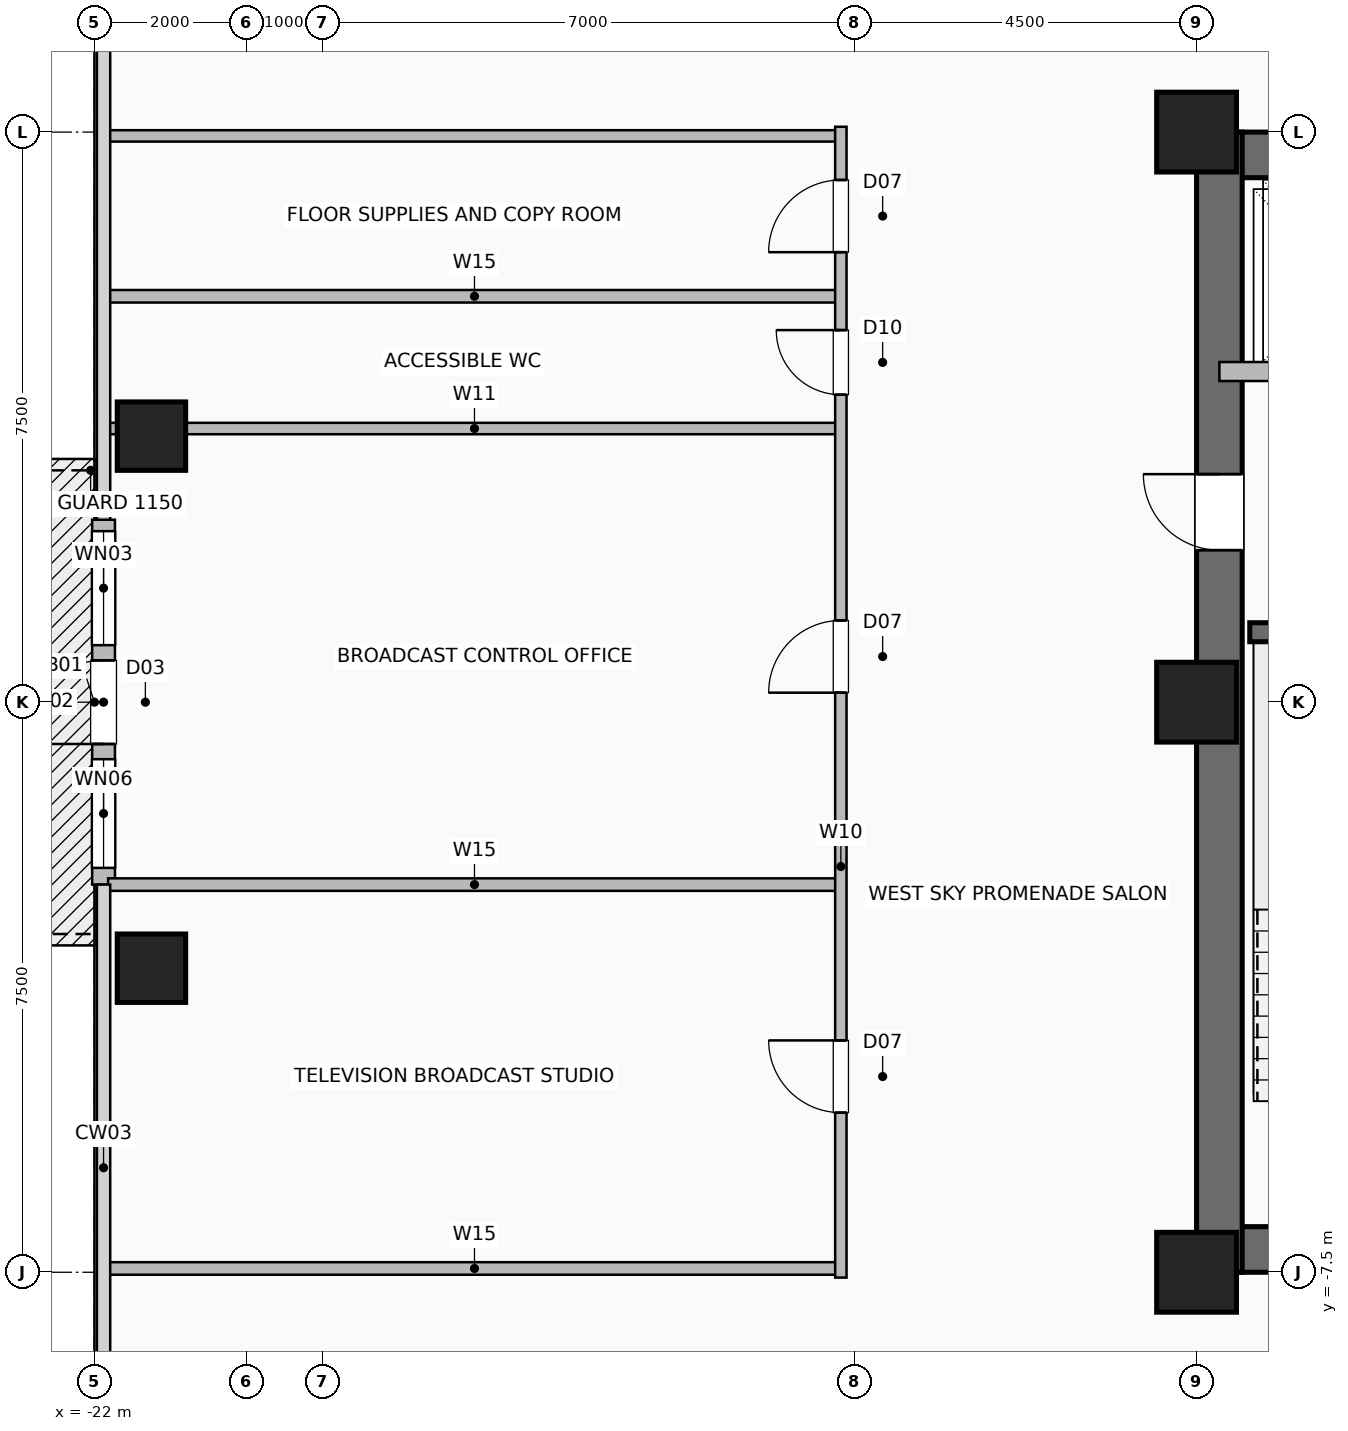
"""IFC4 building model, lengths in metres.
Left out: names, types, materials, properties, quantities, classifications, styles, units other than length and angle.
Written with IfcOpenShell. Run it as: python <this file> out.ifc"""

import sys

from ifc_helpers import new_model, si_unit, direction, frame, frame_2d, origin, origin_2d, place, context, subcontext, project, spatial, rectangle, hollow_rectangle, extrude, element, fill, save


model = new_model("IFC4")
c1 = context("Model", 3, precision=1e-05, world=origin(), true_north=direction((0.0, 1.0)))
c2 = subcontext(c1, "Body", "Model", "MODEL_VIEW")
j1 = project(units=[si_unit("LENGTHUNIT", "METRE"), si_unit("PLANEANGLEUNIT", "RADIAN")], contexts=[c1])
p1 = place(None, origin())
s1 = spatial("IfcSite", under=j1, at=p1, CompositionType="ELEMENT")
p2 = place(p1, origin())
s2 = spatial("IfcBuilding", under=s1, at=p2, CompositionType="ELEMENT")
p3 = place(p2, frame((0.0, 0.0, 144.4)))
s3 = spatial("IfcBuildingStorey", under=s2, at=p3, CompositionType="ELEMENT", Elevation=144.4)
for number, where, z_axis, x_axis in (
    (1, (-7.5, -7.5, 0.0), (0.0, 0.0, 1.0), (1.0, 0.0, 0.0)),
    (2, (-7.5, 7.5, 0.0), (0.0, 0.0, 1.0), (1.0, 0.0, 0.0)),
    (3, (-7.5, 0.0, 0.0), (0.0, 0.0, 1.0), (1.0, 0.0, 0.0)),
):
    element("IfcColumn", number, at=place(p3, frame(where, z_axis=z_axis, x_axis=x_axis)), inside=s3, PredefinedType="COLUMN", context=c2, shape_type="SweptSolid", body=[
        extrude(hollow_rectangle(XDim=1.05, YDim=1.05, WallThickness=0.05, at=origin_2d()), origin(), (0.0, 0.0, 1.0), 3.6),
    ])
for number, where, z_axis, x_axis in (
    (4, (-21.25, -3.5, 0.0), (0.0, 0.0, 1.0), (1.0, 0.0, 0.0)),
    (5, (-21.25, 3.5, 0.0), (0.0, 0.0, 1.0), (1.0, 0.0, 0.0)),
):
    element("IfcColumn", number, at=place(p3, frame(where, z_axis=z_axis, x_axis=x_axis)), inside=s3, PredefinedType="COLUMN", context=c2, shape_type="SweptSolid", body=[
        extrude(hollow_rectangle(XDim=0.9, YDim=0.9, WallThickness=0.045, at=origin_2d()), origin(), (0.0, 0.0, 1.0), 3.6),
    ])
p4 = place(p3, frame((-21.88, -2.4, 0.0), z_axis=(0.0, 0.0, 1.0), x_axis=(0.0, 1.0, 0.0)))
e6 = element("IfcWall", 6, at=p4, inside=s3, PredefinedType="SOLIDWALL", context=c2, shape_type="SweptSolid", body=[
    extrude(rectangle(XDim=4.8, YDim=0.3, at=frame_2d((2.4, 0.0))), origin(), (0.0, 0.0, 1.0), 3.36),
])
p5 = place(p4, frame((1.85, 0.0, 0.0)))
e7 = element("IfcOpeningElement", 7, at=p5, cuts=e6, PredefinedType="OPENING", context=c2, shape_type="SweptSolid", body=[
    extrude(rectangle(XDim=1.1, YDim=2.2, at=frame_2d((0.55, 1.1))), frame((0.0, 0.16, 0.0), z_axis=(0.0, -1.0, 0.0), x_axis=(1.0, 0.0, 0.0)), (0.0, 0.0, 1.0), 0.32),
])
p6 = place(p4, frame((0.22, 0.0, 0.85)))
e8 = element("IfcOpeningElement", 8, at=p6, cuts=e6, PredefinedType="OPENING", context=c2, shape_type="SweptSolid", body=[
    extrude(rectangle(XDim=1.43, YDim=1.8, at=frame_2d((0.715, 0.9))), frame((0.0, 0.16, 0.0), z_axis=(0.0, -1.0, 0.0), x_axis=(1.0, 0.0, 0.0)), (0.0, 0.0, 1.0), 0.32),
])
p7 = place(p4, frame((3.15, 0.0, 0.85)))
e9 = element("IfcOpeningElement", 9, at=p7, cuts=e6, PredefinedType="OPENING", context=c2, shape_type="SweptSolid", body=[
    extrude(rectangle(XDim=1.5, YDim=1.8, at=frame_2d((0.75, 0.9))), frame((0.0, 0.16, 0.0), z_axis=(0.0, -1.0, 0.0), x_axis=(1.0, 0.0, 0.0)), (0.0, 0.0, 1.0), 0.32),
])
p8 = place(p3, frame((-7.5, -7.2, 0.0), z_axis=(0.0, 0.0, 1.0), x_axis=(1.0, 0.0, 0.0)))
e10 = element("IfcWall", 10, at=p8, inside=s3, PredefinedType="SHEAR", context=c2, shape_type="SweptSolid", body=[
    extrude(rectangle(XDim=15.0, YDim=0.6, at=frame_2d((7.5, 0.0))), origin(), (0.0, 0.0, 1.0), 3.36),
])
p9 = place(p8, frame((1.55, 0.0, 0.0)))
e11 = element("IfcOpeningElement", 11, at=p9, cuts=e10, PredefinedType="OPENING", context=c2, shape_type="SweptSolid", body=[
    extrude(rectangle(XDim=1.05, YDim=2.08, at=frame_2d((0.525, 1.04))), frame((0.0, 0.31, 0.0), z_axis=(0.0, -1.0, 0.0), x_axis=(1.0, 0.0, 0.0)), (0.0, 0.0, 1.0), 0.62),
])
p10 = place(p8, frame((12.4, 0.0, 0.0)))
e12 = element("IfcOpeningElement", 12, at=p10, cuts=e10, PredefinedType="OPENING", context=c2, shape_type="SweptSolid", body=[
    extrude(rectangle(XDim=1.05, YDim=2.08, at=frame_2d((0.525, 1.04))), frame((0.0, 0.31, 0.0), z_axis=(0.0, -1.0, 0.0), x_axis=(1.0, 0.0, 0.0)), (0.0, 0.0, 1.0), 0.62),
])
p11 = place(p8, frame((4.95, 0.0, 0.0)))
e13 = element("IfcOpeningElement", 13, at=p11, cuts=e10, PredefinedType="OPENING", context=c2, shape_type="SweptSolid", body=[
    extrude(rectangle(XDim=1.0, YDim=2.08, at=frame_2d((0.5, 1.04))), frame((0.0, 0.31, 0.0), z_axis=(0.0, -1.0, 0.0), x_axis=(1.0, 0.0, 0.0)), (0.0, 0.0, 1.0), 0.62),
])
p12 = place(p8, frame((7.05, 0.0, 0.0)))
e14 = element("IfcOpeningElement", 14, at=p12, cuts=e10, PredefinedType="OPENING", context=c2, shape_type="SweptSolid", body=[
    extrude(rectangle(XDim=1.0, YDim=2.08, at=frame_2d((0.5, 1.04))), frame((0.0, 0.31, 0.0), z_axis=(0.0, -1.0, 0.0), x_axis=(1.0, 0.0, 0.0)), (0.0, 0.0, 1.0), 0.62),
])
p13 = place(p8, frame((9.15, 0.0, 0.0)))
e15 = element("IfcOpeningElement", 15, at=p13, cuts=e10, PredefinedType="OPENING", context=c2, shape_type="SweptSolid", body=[
    extrude(rectangle(XDim=1.0, YDim=2.08, at=frame_2d((0.5, 1.04))), frame((0.0, 0.31, 0.0), z_axis=(0.0, -1.0, 0.0), x_axis=(1.0, 0.0, 0.0)), (0.0, 0.0, 1.0), 0.62),
])
p14 = place(p3, frame((-7.5, 7.2, 0.0), z_axis=(0.0, 0.0, 1.0), x_axis=(1.0, 0.0, 0.0)))
e16 = element("IfcWall", 16, at=p14, inside=s3, PredefinedType="SHEAR", context=c2, shape_type="SweptSolid", body=[
    extrude(rectangle(XDim=15.0, YDim=0.6, at=frame_2d((7.5, 0.0))), origin(), (0.0, 0.0, 1.0), 3.36),
])
p15 = place(p3, frame((-7.2, -7.5, 0.0), z_axis=(0.0, 0.0, 1.0), x_axis=(0.0, 1.0, 0.0)))
e17 = element("IfcWall", 17, at=p15, inside=s3, PredefinedType="SHEAR", context=c2, shape_type="SweptSolid", body=[
    extrude(rectangle(XDim=15.0, YDim=0.6, at=frame_2d((7.5, 0.0))), origin(), (0.0, 0.0, 1.0), 3.36),
])
p16 = place(p15, frame((9.5, 0.0, 0.0)))
e18 = element("IfcOpeningElement", 18, at=p16, cuts=e17, PredefinedType="OPENING", context=c2, shape_type="SweptSolid", body=[
    extrude(rectangle(XDim=1.0, YDim=2.08, at=frame_2d((0.5, 1.04))), frame((0.0, 0.31, 0.0), z_axis=(0.0, -1.0, 0.0), x_axis=(1.0, 0.0, 0.0)), (0.0, 0.0, 1.0), 0.62),
])
p17 = place(p3, frame((-6.8, 0.92, 0.0), z_axis=(0.0, 0.0, 1.0), x_axis=(1.0, 0.0, 0.0)))
e19 = element("IfcWall", 19, at=p17, inside=s3, PredefinedType="SHEAR", context=c2, shape_type="SweptSolid", body=[
    extrude(rectangle(XDim=3.33, YDim=0.25, at=frame_2d((1.665, 0.0))), origin(), (0.0, 0.0, 1.0), 3.36),
])
p18 = place(p3, frame((-7.2, 4.35, 0.0), z_axis=(0.0, 0.0, 1.0), x_axis=(1.0, 0.0, 0.0)))
e20 = element("IfcWall", 20, at=p18, inside=s3, PredefinedType="SHEAR", context=c2, shape_type="SweptSolid", body=[
    extrude(rectangle(XDim=2.7, YDim=0.25, at=frame_2d((1.35, 0.0))), origin(), (0.0, 0.0, 1.0), 3.36),
])
p19 = place(p18, frame((0.75, 0.0, 0.0)))
e21 = element("IfcOpeningElement", 21, at=p19, cuts=e20, PredefinedType="OPENING", context=c2, shape_type="SweptSolid", body=[
    extrude(rectangle(XDim=1.2, YDim=2.2, at=frame_2d((0.6, 1.1))), frame((0.0, 0.135, 0.0), z_axis=(0.0, -1.0, 0.0), x_axis=(1.0, 0.0, 0.0)), (0.0, 0.0, 1.0), 0.27),
])
for number, where, z_axis, x_axis in (
    (22, (-21.82, 5.34, 0.0), (0.0, 0.0, 1.0), (1.0, 0.0, 0.0)),
    (23, (-21.82, -7.45, 0.0), (0.0, 0.0, 1.0), (1.0, 0.0, 0.0)),
    (24, (-21.82, -2.4, 0.0), (0.0, 0.0, 1.0), (1.0, 0.0, 0.0)),
):
    element("IfcWall", number, at=place(p3, frame(where, z_axis=z_axis, x_axis=x_axis)), inside=s3, PredefinedType="PLUMBINGWALL", context=c2, shape_type="SweptSolid", body=[
        extrude(rectangle(XDim=9.64, YDim=0.165, at=frame_2d((4.82, 0.0))), origin(), (0.0, 0.0, 1.0), 3.36),
    ])
p20 = place(p3, frame((-21.82, 3.6, 0.0), z_axis=(0.0, 0.0, 1.0), x_axis=(1.0, 0.0, 0.0)))
e25 = element("IfcWall", 25, at=p20, inside=s3, PredefinedType="PARTITIONING", context=c2, shape_type="SweptSolid", body=[
    extrude(rectangle(XDim=9.64, YDim=0.15, at=frame_2d((4.82, 0.0))), origin(), (0.0, 0.0, 1.0), 2.718),
])
p21 = place(p3, frame((-21.82, 7.45, 0.0), z_axis=(0.0, 0.0, 1.0), x_axis=(1.0, 0.0, 0.0)))
e26 = element("IfcWall", 26, at=p21, inside=s3, PredefinedType="PARTITIONING", context=c2, shape_type="SweptSolid", body=[
    extrude(rectangle(XDim=9.64, YDim=0.15, at=frame_2d((4.82, 0.0))), origin(), (0.0, 0.0, 1.0), 3.36),
])
p22 = place(p3, frame((-12.18, -7.57, 0.0), z_axis=(0.0, 0.0, 1.0), x_axis=(0.0, 1.0, 0.0)))
e27 = element("IfcWall", 27, at=p22, inside=s3, PredefinedType="PARTITIONING", context=c2, shape_type="SweptSolid", body=[
    extrude(rectangle(XDim=15.14, YDim=0.15, at=frame_2d((7.57, 0.0))), origin(), (0.0, 0.0, 1.0), 3.36),
])
p23 = place(p22, frame((2.17, 0.0, 0.0)))
e28 = element("IfcOpeningElement", 28, at=p23, cuts=e27, PredefinedType="OPENING", context=c2, shape_type="SweptSolid", body=[
    extrude(rectangle(XDim=0.95, YDim=2.06, at=frame_2d((0.475, 1.03))), frame((0.0, 0.085, 0.0), z_axis=(0.0, -1.0, 0.0), x_axis=(1.0, 0.0, 0.0)), (0.0, 0.0, 1.0), 0.17),
])
p24 = place(p22, frame((7.695, 0.0, 0.0)))
e29 = element("IfcOpeningElement", 29, at=p24, cuts=e27, PredefinedType="OPENING", context=c2, shape_type="SweptSolid", body=[
    extrude(rectangle(XDim=0.95, YDim=2.06, at=frame_2d((0.475, 1.03))), frame((0.0, 0.085, 0.0), z_axis=(0.0, -1.0, 0.0), x_axis=(1.0, 0.0, 0.0)), (0.0, 0.0, 1.0), 0.17),
])
p25 = place(p22, frame((11.615, 0.0, 0.0)))
e30 = element("IfcOpeningElement", 30, at=p25, cuts=e27, PredefinedType="OPENING", context=c2, shape_type="SweptSolid", body=[
    extrude(rectangle(XDim=0.85, YDim=2.05, at=frame_2d((0.425, 1.025))), frame((0.0, 0.085, 0.0), z_axis=(0.0, -1.0, 0.0), x_axis=(1.0, 0.0, 0.0)), (0.0, 0.0, 1.0), 0.17),
])
p26 = place(p22, frame((13.49, 0.0, 0.0)))
e31 = element("IfcOpeningElement", 31, at=p26, cuts=e27, PredefinedType="OPENING", context=c2, shape_type="SweptSolid", body=[
    extrude(rectangle(XDim=0.95, YDim=2.06, at=frame_2d((0.475, 1.03))), frame((0.0, 0.085, 0.0), z_axis=(0.0, -1.0, 0.0), x_axis=(1.0, 0.0, 0.0)), (0.0, 0.0, 1.0), 0.17),
])
p27 = place(p5, origin())
e32 = element("IfcDoor", 32, at=p27, inside=s3, OperationType="SINGLE_SWING_LEFT", PredefinedType="DOOR", context=c2, shape_type="SweptSolid", body=[
    extrude(rectangle(XDim=1.1, YDim=2.2, at=frame_2d((0.55, 1.1))), frame((0.0, 0.025, 0.0), z_axis=(0.0, -1.0, 0.0), x_axis=(1.0, 0.0, 0.0)), (0.0, 0.0, 1.0), 0.05),
])
fill(e7, e32)
p28 = place(p6, origin())
e33 = element("IfcWindow", 33, at=p28, inside=s3, PartitioningType="SINGLE_PANEL", PredefinedType="WINDOW", context=c2, shape_type="SweptSolid", body=[
    extrude(rectangle(XDim=1.43, YDim=1.8, at=frame_2d((0.715, 0.9))), frame((0.0, 0.03, 0.0), z_axis=(0.0, -1.0, 0.0), x_axis=(1.0, 0.0, 0.0)), (0.0, 0.0, 1.0), 0.06),
])
fill(e8, e33)
p29 = place(p7, origin())
e34 = element("IfcWindow", 34, at=p29, inside=s3, PartitioningType="SINGLE_PANEL", PredefinedType="WINDOW", context=c2, shape_type="SweptSolid", body=[
    extrude(rectangle(XDim=1.5, YDim=1.8, at=frame_2d((0.75, 0.9))), frame((0.0, 0.03, 0.0), z_axis=(0.0, -1.0, 0.0), x_axis=(1.0, 0.0, 0.0)), (0.0, 0.0, 1.0), 0.06),
])
fill(e9, e34)
p30 = place(p16, origin())
e35 = element("IfcDoor", 35, at=p30, inside=s3, OperationType="SINGLE_SWING_RIGHT", PredefinedType="DOOR", context=c2, shape_type="SweptSolid", body=[
    extrude(rectangle(XDim=1.0, YDim=2.08, at=frame_2d((0.5, 1.04))), frame((0.0, 0.025, 0.0), z_axis=(0.0, -1.0, 0.0), x_axis=(1.0, 0.0, 0.0)), (0.0, 0.0, 1.0), 0.05),
])
fill(e18, e35)
p31 = place(p23, origin())
e36 = element("IfcDoor", 36, at=p31, inside=s3, OperationType="SINGLE_SWING_RIGHT", PredefinedType="DOOR", context=c2, shape_type="SweptSolid", body=[
    extrude(rectangle(XDim=0.95, YDim=2.06, at=frame_2d((0.475, 1.03))), frame((0.0, 0.025, 0.0), z_axis=(0.0, -1.0, 0.0), x_axis=(1.0, 0.0, 0.0)), (0.0, 0.0, 1.0), 0.05),
])
fill(e28, e36)
p32 = place(p24, origin())
e37 = element("IfcDoor", 37, at=p32, inside=s3, OperationType="SINGLE_SWING_LEFT", PredefinedType="DOOR", context=c2, shape_type="SweptSolid", body=[
    extrude(rectangle(XDim=0.95, YDim=2.06, at=frame_2d((0.475, 1.03))), frame((0.0, 0.025, 0.0), z_axis=(0.0, -1.0, 0.0), x_axis=(1.0, 0.0, 0.0)), (0.0, 0.0, 1.0), 0.05),
])
fill(e29, e37)
p33 = place(p25, origin())
e38 = element("IfcDoor", 38, at=p33, inside=s3, OperationType="SINGLE_SWING_RIGHT", PredefinedType="DOOR", context=c2, shape_type="SweptSolid", body=[
    extrude(rectangle(XDim=0.85, YDim=2.05, at=frame_2d((0.425, 1.025))), frame((0.0, 0.025, 0.0), z_axis=(0.0, -1.0, 0.0), x_axis=(1.0, 0.0, 0.0)), (0.0, 0.0, 1.0), 0.05),
])
fill(e30, e38)
p34 = place(p26, origin())
e39 = element("IfcDoor", 39, at=p34, inside=s3, OperationType="SINGLE_SWING_LEFT", PredefinedType="DOOR", context=c2, shape_type="SweptSolid", body=[
    extrude(rectangle(XDim=0.95, YDim=2.06, at=frame_2d((0.475, 1.03))), frame((0.0, 0.025, 0.0), z_axis=(0.0, -1.0, 0.0), x_axis=(1.0, 0.0, 0.0)), (0.0, 0.0, 1.0), 0.05),
])
fill(e31, e39)
save(model, sys.argv[1])
